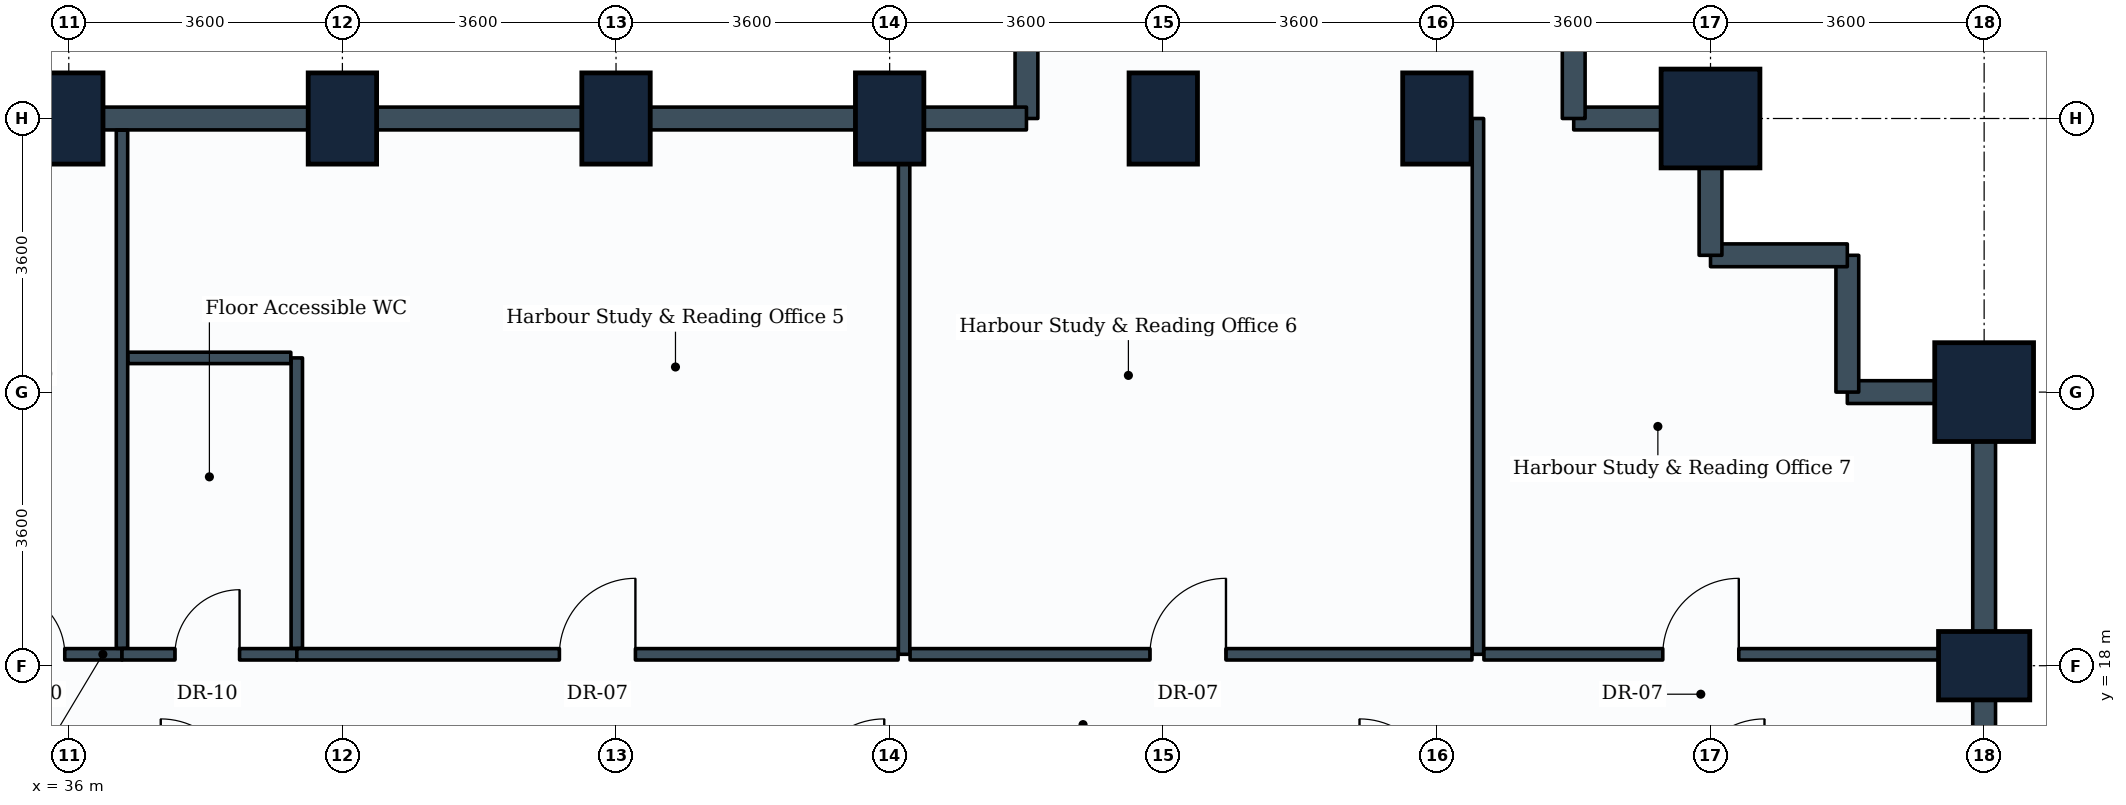
"""IFC4 building model, lengths in metres.
Left out: names, types, materials, properties, quantities, classifications, styles, units other than length and angle.
Written with IfcOpenShell. Run it as: python <this file> out.ifc"""

import sys

from ifc_helpers import new_model, si_unit, direction, frame, frame_2d, origin, origin_2d, place, context, subcontext, project, spatial, rectangle, extrude, element, fill, save


model = new_model("IFC4")
c1 = context("Model", 3, precision=1e-05, world=origin(), true_north=direction((0.0, 1.0)))
c2 = subcontext(c1, "Body", "Model", "MODEL_VIEW")
j1 = project(units=[si_unit("LENGTHUNIT", "METRE"), si_unit("PLANEANGLEUNIT", "RADIAN")], contexts=[c1])
p1 = place(None, origin())
s1 = spatial("IfcSite", under=j1, at=p1, CompositionType="ELEMENT")
p2 = place(p1, origin())
s2 = spatial("IfcBuilding", under=s1, at=p2, CompositionType="ELEMENT")
p3 = place(p2, frame((0.0, 0.0, 43.5)))
s3 = spatial("IfcBuildingStorey", under=s2, at=p3, CompositionType="ELEMENT", Elevation=43.5)
for number, where, z_axis, x_axis in (
    (1, (36.0, 25.2, 0.0), (0.0, 0.0, 1.0), (1.0, 0.0, 0.0)),
    (2, (39.6, 25.2, 0.0), (0.0, 0.0, 1.0), (1.0, 0.0, 0.0)),
    (3, (43.2, 25.2, 0.0), (0.0, 0.0, 1.0), (1.0, 0.0, 0.0)),
    (4, (46.8, 25.2, 0.0), (0.0, 0.0, 1.0), (1.0, 0.0, 0.0)),
    (5, (50.4, 25.2, 0.0), (0.0, 0.0, 1.0), (1.0, 0.0, 0.0)),
    (6, (54.0, 25.2, 0.0), (0.0, 0.0, 1.0), (1.0, 0.0, 0.0)),
):
    element("IfcColumn", number, at=place(p3, frame(where, z_axis=z_axis, x_axis=x_axis)), inside=s3, PredefinedType="COLUMN", context=c2, shape_type="SweptSolid", body=[
        extrude(rectangle(XDim=0.9, YDim=1.2, at=origin_2d()), origin(), (0.0, 0.0, 1.0), 3.9),
    ])
p4 = place(p3, frame((57.6, 25.2, 0.0), z_axis=(0.0, 0.0, 1.0), x_axis=(1.0, 0.0, 0.0)))
e7 = element("IfcColumn", 7, at=p4, inside=s3, PredefinedType="COLUMN", context=c2, shape_type="SweptSolid", body=[
    extrude(rectangle(XDim=1.3, YDim=1.3, at=origin_2d()), origin(), (0.0, 0.0, 1.0), 3.9),
])
p5 = place(p3, frame((61.2, 18.0, 0.0), z_axis=(0.0, 0.0, 1.0), x_axis=(0.0, 1.0, 0.0)))
e8 = element("IfcColumn", 8, at=p5, inside=s3, PredefinedType="COLUMN", context=c2, shape_type="SweptSolid", body=[
    extrude(rectangle(XDim=0.9, YDim=1.2, at=origin_2d()), origin(), (0.0, 0.0, 1.0), 3.9),
])
p6 = place(p3, frame((61.2, 21.6, 0.0), z_axis=(0.0, 0.0, 1.0), x_axis=(0.0, 1.0, 0.0)))
e9 = element("IfcColumn", 9, at=p6, inside=s3, PredefinedType="COLUMN", context=c2, shape_type="SweptSolid", body=[
    extrude(rectangle(XDim=1.3, YDim=1.3, at=origin_2d()), origin(), (0.0, 0.0, 1.0), 3.9),
])
for number, where, z_axis, x_axis in (
    (10, (61.2, 18.0, 0.0), (0.0, 0.0, 1.0), (0.0, -1.0, 0.0)),
    (11, (61.2, 21.6, 0.0), (0.0, 0.0, 1.0), (0.0, -1.0, 0.0)),
):
    element("IfcWall", number, at=place(p3, frame(where, z_axis=z_axis, x_axis=x_axis)), inside=s3, PredefinedType="STANDARD", context=c2, shape_type="SweptSolid", body=[
        extrude(rectangle(XDim=3.6, YDim=0.3, at=frame_2d((1.8, 0.0))), origin(), (0.0, 0.0, 1.0), 2.93),
    ])
p7 = place(p3, frame((61.2, 21.6, 0.0), z_axis=(0.0, 0.0, 1.0), x_axis=(-1.0, 0.0, 0.0)))
e12 = element("IfcWall", 12, at=p7, inside=s3, PredefinedType="STANDARD", context=c2, shape_type="SweptSolid", body=[
    extrude(rectangle(XDim=1.8, YDim=0.3, at=frame_2d((0.9, 0.0))), origin(), (0.0, 0.0, 1.0), 2.93),
])
for number, where, z_axis, x_axis in (
    (13, (59.4, 23.4, 0.0), (0.0, 0.0, 1.0), (0.0, -1.0, 0.0)),
    (14, (57.6, 23.4, 0.0), (0.0, 0.0, 1.0), (1.0, 0.0, 0.0)),
):
    element("IfcWall", number, at=place(p3, frame(where, z_axis=z_axis, x_axis=x_axis)), inside=s3, PredefinedType="STANDARD", context=c2, shape_type="SweptSolid", body=[
        extrude(rectangle(XDim=1.8, YDim=0.3, at=frame_2d((0.9, 0.0))), origin(), (0.0, 0.0, 1.0), 3.635),
    ])
for number, where, z_axis, x_axis in (
    (15, (57.6, 25.2, 0.0), (0.0, 0.0, 1.0), (0.0, -1.0, 0.0)),
    (16, (55.8, 25.2, 0.0), (0.0, 0.0, 1.0), (1.0, 0.0, 0.0)),
):
    element("IfcWall", number, at=place(p3, frame(where, z_axis=z_axis, x_axis=x_axis)), inside=s3, PredefinedType="STANDARD", context=c2, shape_type="SweptSolid", body=[
        extrude(rectangle(XDim=1.8, YDim=0.3, at=frame_2d((0.9, 0.0))), origin(), (0.0, 0.0, 1.0), 2.93),
    ])
for number, where, z_axis, x_axis in (
    (17, (55.8, 27.3, 0.0), (0.0, 0.0, 1.0), (0.0, -1.0, 0.0)),
    (18, (48.6, 27.3, 0.0), (0.0, 0.0, 1.0), (0.0, -1.0, 0.0)),
):
    element("IfcWall", number, at=place(p3, frame(where, z_axis=z_axis, x_axis=x_axis)), inside=s3, PredefinedType="STANDARD", context=c2, shape_type="SweptSolid", body=[
        extrude(rectangle(XDim=2.1, YDim=0.3, at=frame_2d((1.05, 0.0))), origin(), (0.0, 0.0, 1.0), 2.93),
    ])
p8 = place(p3, frame((46.8, 25.2, 0.0), z_axis=(0.0, 0.0, 1.0), x_axis=(1.0, 0.0, 0.0)))
e19 = element("IfcWall", 19, at=p8, inside=s3, PredefinedType="STANDARD", context=c2, shape_type="SweptSolid", body=[
    extrude(rectangle(XDim=1.8, YDim=0.3, at=frame_2d((0.9, 0.0))), origin(), (0.0, 0.0, 1.0), 2.93),
])
p9 = place(p3, frame((43.2, 25.2, 0.0), z_axis=(0.0, 0.0, 1.0), x_axis=(1.0, 0.0, 0.0)))
e20 = element("IfcWall", 20, at=p9, inside=s3, PredefinedType="STANDARD", context=c2, shape_type="SweptSolid", body=[
    extrude(rectangle(XDim=3.6, YDim=0.3, at=frame_2d((1.8, 0.0))), origin(), (0.0, 0.0, 1.0), 2.93),
])
p10 = place(p3, frame((39.6, 25.2, 0.0), z_axis=(0.0, 0.0, 1.0), x_axis=(1.0, 0.0, 0.0)))
e21 = element("IfcWall", 21, at=p10, inside=s3, PredefinedType="STANDARD", context=c2, shape_type="SweptSolid", body=[
    extrude(rectangle(XDim=3.6, YDim=0.3, at=frame_2d((1.8, 0.0))), origin(), (0.0, 0.0, 1.0), 2.93),
])
for number, where, z_axis, x_axis in (
    (22, (36.0, 25.2, 0.0), (0.0, 0.0, 1.0), (1.0, 0.0, 0.0)),
    (23, (32.4, 25.2, 0.0), (0.0, 0.0, 1.0), (1.0, 0.0, 0.0)),
):
    element("IfcWall", number, at=place(p3, frame(where, z_axis=z_axis, x_axis=x_axis)), inside=s3, PredefinedType="STANDARD", context=c2, shape_type="SweptSolid", body=[
        extrude(rectangle(XDim=3.6, YDim=0.3, at=frame_2d((1.8, 0.0))), origin(), (0.0, 0.0, 1.0), 2.93),
    ])
p11 = place(p3, frame((34.479, 18.15, 0.0), z_axis=(0.0, 0.0, 1.0), x_axis=(1.0, 0.0, 0.0)))
e24 = element("IfcWall", 24, at=p11, inside=s3, PredefinedType="PARTITIONING", context=c2, shape_type="SweptSolid", body=[
    extrude(rectangle(XDim=2.221, YDim=0.15, at=frame_2d((1.11, 0.0))), origin(), (0.0, 0.0, 1.0), 3.08),
])
p12 = place(p11, frame((0.618, 0.0, 0.0)))
e25 = element("IfcOpeningElement", 25, at=p12, cuts=e24, PredefinedType="OPENING", context=c2, shape_type="SweptSolid", body=[
    extrude(rectangle(XDim=0.85, YDim=2.1, at=frame_2d((0.425, 1.05))), frame((0.0, 0.085, 0.0), z_axis=(0.0, -1.0, 0.0), x_axis=(1.0, 0.0, 0.0)), (0.0, 0.0, 1.0), 0.17),
])
p13 = place(p3, frame((36.7, 18.229, 0.0), z_axis=(0.0, 0.0, 1.0), x_axis=(0.0, 1.0, 0.0)))
e26 = element("IfcWall", 26, at=p13, inside=s3, PredefinedType="PARTITIONING", context=c2, shape_type="SweptSolid", body=[
    extrude(rectangle(XDim=6.817, YDim=0.15, at=frame_2d((3.408, 0.0))), origin(), (0.0, 0.0, 1.0), 2.93),
])
p14 = place(p3, frame((36.7, 18.15, 0.0), z_axis=(0.0, 0.0, 1.0), x_axis=(1.0, 0.0, 0.0)))
e27 = element("IfcWall", 27, at=p14, inside=s3, PredefinedType="PARTITIONING", context=c2, shape_type="SweptSolid", body=[
    extrude(rectangle(XDim=2.3, YDim=0.15, at=frame_2d((1.15, 0.0))), origin(), (0.0, 0.0, 1.0), 3.08),
])
p15 = place(p14, frame((0.697, 0.0, 0.0)))
e28 = element("IfcOpeningElement", 28, at=p15, cuts=e27, PredefinedType="OPENING", context=c2, shape_type="SweptSolid", body=[
    extrude(rectangle(XDim=0.85, YDim=2.1, at=frame_2d((0.425, 1.05))), frame((0.0, 0.085, 0.0), z_axis=(0.0, -1.0, 0.0), x_axis=(1.0, 0.0, 0.0)), (0.0, 0.0, 1.0), 0.17),
])
p16 = place(p3, frame((39.0, 18.229, 0.0), z_axis=(0.0, 0.0, 1.0), x_axis=(0.0, 1.0, 0.0)))
e29 = element("IfcWall", 29, at=p16, inside=s3, PredefinedType="PARTITIONING", context=c2, shape_type="SweptSolid", body=[
    extrude(rectangle(XDim=3.821, YDim=0.15, at=frame_2d((1.911, 0.0))), origin(), (0.0, 0.0, 1.0), 3.03),
])
p17 = place(p3, frame((36.779, 22.05, 0.0), z_axis=(0.0, 0.0, 1.0), x_axis=(1.0, 0.0, 0.0)))
e30 = element("IfcWall", 30, at=p17, inside=s3, PredefinedType="PARTITIONING", context=c2, shape_type="SweptSolid", body=[
    extrude(rectangle(XDim=2.142, YDim=0.15, at=frame_2d((1.071, 0.0))), origin(), (0.0, 0.0, 1.0), 3.635),
])
p18 = place(p3, frame((46.99, 18.15, 0.0), z_axis=(0.0, 0.0, 1.0), x_axis=(0.0, 1.0, 0.0)))
e31 = element("IfcWall", 31, at=p18, inside=s3, PredefinedType="PARTITIONING", context=c2, shape_type="SweptSolid", body=[
    extrude(rectangle(XDim=6.896, YDim=0.15, at=frame_2d((3.448, 0.0))), origin(), (0.0, 0.0, 1.0), 2.93),
])
p19 = place(p3, frame((39.0, 18.15, 0.0), z_axis=(0.0, 0.0, 1.0), x_axis=(1.0, 0.0, 0.0)))
e32 = element("IfcWall", 32, at=p19, inside=s3, PredefinedType="PARTITIONING", context=c2, shape_type="SweptSolid", body=[
    extrude(rectangle(XDim=7.911, YDim=0.15, at=frame_2d((3.956, 0.0))), origin(), (0.0, 0.0, 1.0), 3.03),
])
p20 = place(p19, frame((3.455, 0.0, 0.0)))
e33 = element("IfcOpeningElement", 33, at=p20, cuts=e32, PredefinedType="OPENING", context=c2, shape_type="SweptSolid", body=[
    extrude(rectangle(XDim=1.0, YDim=2.1, at=frame_2d((0.5, 1.05))), frame((0.0, 0.085, 0.0), z_axis=(0.0, -1.0, 0.0), x_axis=(1.0, 0.0, 0.0)), (0.0, 0.0, 1.0), 0.17),
])
p21 = place(p3, frame((54.54, 18.15, 0.0), z_axis=(0.0, 0.0, 1.0), x_axis=(0.0, 1.0, 0.0)))
e34 = element("IfcWall", 34, at=p21, inside=s3, PredefinedType="PARTITIONING", context=c2, shape_type="SweptSolid", body=[
    extrude(rectangle(XDim=7.05, YDim=0.15, at=frame_2d((3.525, 0.0))), origin(), (0.0, 0.0, 1.0), 2.93),
])
p22 = place(p3, frame((47.069, 18.15, 0.0), z_axis=(0.0, 0.0, 1.0), x_axis=(1.0, 0.0, 0.0)))
e35 = element("IfcWall", 35, at=p22, inside=s3, PredefinedType="PARTITIONING", context=c2, shape_type="SweptSolid", body=[
    extrude(rectangle(XDim=7.392, YDim=0.15, at=frame_2d((3.696, 0.0))), origin(), (0.0, 0.0, 1.0), 3.04),
])
p23 = place(p22, frame((3.156, 0.0, 0.0)))
e36 = element("IfcOpeningElement", 36, at=p23, cuts=e35, PredefinedType="OPENING", context=c2, shape_type="SweptSolid", body=[
    extrude(rectangle(XDim=1.0, YDim=2.1, at=frame_2d((0.5, 1.05))), frame((0.0, 0.085, 0.0), z_axis=(0.0, -1.0, 0.0), x_axis=(1.0, 0.0, 0.0)), (0.0, 0.0, 1.0), 0.17),
])
p24 = place(p3, frame((54.619, 18.15, 0.0), z_axis=(0.0, 0.0, 1.0), x_axis=(1.0, 0.0, 0.0)))
e37 = element("IfcWall", 37, at=p24, inside=s3, PredefinedType="PARTITIONING", context=c2, shape_type="SweptSolid", body=[
    extrude(rectangle(XDim=6.427, YDim=0.15, at=frame_2d((3.213, 0.0))), origin(), (0.0, 0.0, 1.0), 2.93),
])
p25 = place(p24, frame((2.353, 0.0, 0.0)))
e38 = element("IfcOpeningElement", 38, at=p25, cuts=e37, PredefinedType="OPENING", context=c2, shape_type="SweptSolid", body=[
    extrude(rectangle(XDim=1.0, YDim=2.1, at=frame_2d((0.5, 1.05))), frame((0.0, 0.085, 0.0), z_axis=(0.0, -1.0, 0.0), x_axis=(1.0, 0.0, 0.0)), (0.0, 0.0, 1.0), 0.17),
])
p26 = place(p12, origin())
e39 = element("IfcDoor", 39, at=p26, inside=s3, OperationType="SINGLE_SWING_LEFT", PredefinedType="DOOR", context=c2, shape_type="SweptSolid", body=[
    extrude(rectangle(XDim=0.85, YDim=2.1, at=frame_2d((0.425, 1.05))), frame((0.0, 0.025, 0.0), z_axis=(0.0, -1.0, 0.0), x_axis=(1.0, 0.0, 0.0)), (0.0, 0.0, 1.0), 0.05),
])
fill(e25, e39)
p27 = place(p15, origin())
e40 = element("IfcDoor", 40, at=p27, inside=s3, OperationType="SINGLE_SWING_RIGHT", PredefinedType="DOOR", context=c2, shape_type="SweptSolid", body=[
    extrude(rectangle(XDim=0.85, YDim=2.1, at=frame_2d((0.425, 1.05))), frame((0.0, 0.025, 0.0), z_axis=(0.0, -1.0, 0.0), x_axis=(1.0, 0.0, 0.0)), (0.0, 0.0, 1.0), 0.05),
])
fill(e28, e40)
p28 = place(p20, origin())
e41 = element("IfcDoor", 41, at=p28, inside=s3, OperationType="SINGLE_SWING_RIGHT", PredefinedType="DOOR", context=c2, shape_type="SweptSolid", body=[
    extrude(rectangle(XDim=1.0, YDim=2.1, at=frame_2d((0.5, 1.05))), frame((0.0, 0.025, 0.0), z_axis=(0.0, -1.0, 0.0), x_axis=(1.0, 0.0, 0.0)), (0.0, 0.0, 1.0), 0.05),
])
fill(e33, e41)
p29 = place(p23, origin())
e42 = element("IfcDoor", 42, at=p29, inside=s3, OperationType="SINGLE_SWING_RIGHT", PredefinedType="DOOR", context=c2, shape_type="SweptSolid", body=[
    extrude(rectangle(XDim=1.0, YDim=2.1, at=frame_2d((0.5, 1.05))), frame((0.0, 0.025, 0.0), z_axis=(0.0, -1.0, 0.0), x_axis=(1.0, 0.0, 0.0)), (0.0, 0.0, 1.0), 0.05),
])
fill(e36, e42)
p30 = place(p25, origin())
e43 = element("IfcDoor", 43, at=p30, inside=s3, OperationType="SINGLE_SWING_RIGHT", PredefinedType="DOOR", context=c2, shape_type="SweptSolid", body=[
    extrude(rectangle(XDim=1.0, YDim=2.1, at=frame_2d((0.5, 1.05))), frame((0.0, 0.025, 0.0), z_axis=(0.0, -1.0, 0.0), x_axis=(1.0, 0.0, 0.0)), (0.0, 0.0, 1.0), 0.05),
])
fill(e38, e43)
save(model, sys.argv[1])
